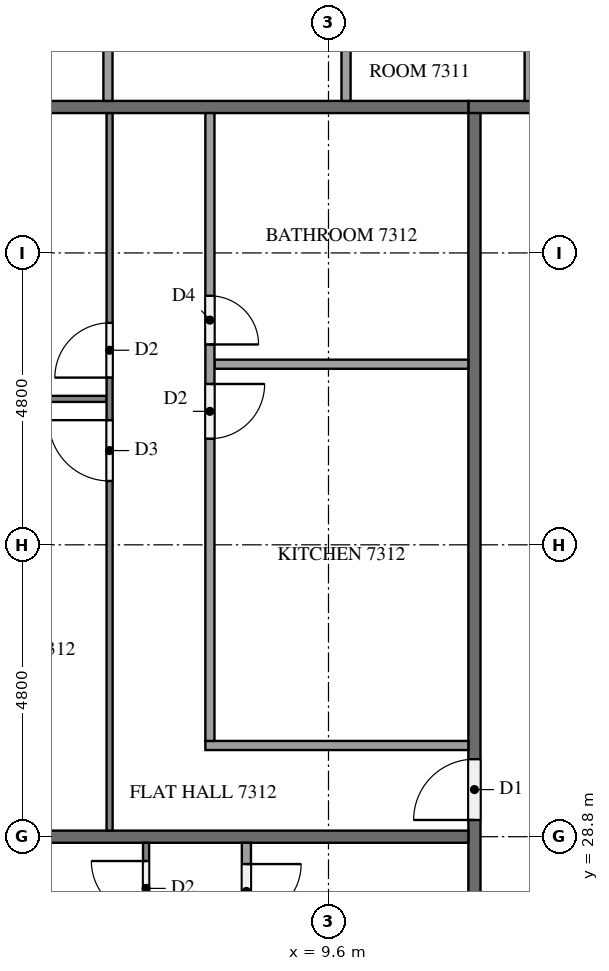
"""IFC4 building model, lengths in metres.
Left out: names, types, materials, properties, quantities, classifications, styles, units other than length and angle.
Written with IfcOpenShell. Run it as: python <this file> out.ifc"""

import sys

from ifc_helpers import new_model, si_unit, direction, frame, frame_2d, origin, place, context, subcontext, project, spatial, rectangle, extrude, element, fill, save


model = new_model("IFC4")
c1 = context("Model", 3, precision=1e-05, world=origin(), true_north=direction((0.0, 1.0)))
c2 = subcontext(c1, "Body", "Model", "MODEL_VIEW")
j1 = project(units=[si_unit("LENGTHUNIT", "METRE"), si_unit("PLANEANGLEUNIT", "RADIAN")], contexts=[c1])
p1 = place(None, origin())
s1 = spatial("IfcSite", under=j1, at=p1, CompositionType="ELEMENT")
p2 = place(p1, origin())
s2 = spatial("IfcBuilding", under=s1, at=p2, CompositionType="ELEMENT")
p3 = place(p2, frame((0.0, 0.0, 279.1)))
s3 = spatial("IfcBuildingStorey", under=s2, at=p3, CompositionType="ELEMENT", Elevation=279.1)
p4 = place(p3, frame((11.9, 40.8, 0.0), z_axis=(0.0, 0.0, 1.0), x_axis=(1.0, 0.0, 0.0)))
e1 = element("IfcWall", 1, at=p4, inside=s3, PredefinedType="PARTITIONING", context=c2, shape_type="SweptSolid", body=[
    extrude(rectangle(XDim=38.6, YDim=0.2, at=frame_2d((19.3, 0.0))), origin(), (0.0, 0.0, 1.0), 3.2),
])
p5 = place(p4, frame((33.975, 0.0, 0.0)))
e2 = element("IfcOpeningElement", 2, at=p5, cuts=e1, PredefinedType="OPENING", context=c2, shape_type="SweptSolid", body=[
    extrude(rectangle(XDim=1.0, YDim=2.1, at=frame_2d((0.5, 1.05))), frame((0.0, 0.11, 0.0), z_axis=(0.0, -1.0, 0.0), x_axis=(1.0, 0.0, 0.0)), (0.0, 0.0, 1.0), 0.22),
])
p6 = place(p4, frame((14.725, 0.0, 0.0)))
e3 = element("IfcOpeningElement", 3, at=p6, cuts=e1, PredefinedType="OPENING", context=c2, shape_type="SweptSolid", body=[
    extrude(rectangle(XDim=1.1, YDim=2.1, at=frame_2d((0.55, 1.05))), frame((0.0, 0.11, 0.0), z_axis=(0.0, -1.0, 0.0), x_axis=(1.0, 0.0, 0.0)), (0.0, 0.0, 1.0), 0.22),
])
p7 = place(p4, frame((13.225, 0.0, 0.0)))
e4 = element("IfcOpeningElement", 4, at=p7, cuts=e1, PredefinedType="OPENING", context=c2, shape_type="SweptSolid", body=[
    extrude(rectangle(XDim=1.0, YDim=2.1, at=frame_2d((0.5, 1.05))), frame((0.0, 0.11, 0.0), z_axis=(0.0, -1.0, 0.0), x_axis=(1.0, 0.0, 0.0)), (0.0, 0.0, 1.0), 0.22),
])
p8 = place(p4, frame((1.225, 0.0, 0.0)))
e5 = element("IfcOpeningElement", 5, at=p8, cuts=e1, PredefinedType="OPENING", context=c2, shape_type="SweptSolid", body=[
    extrude(rectangle(XDim=1.0, YDim=2.1, at=frame_2d((0.5, 1.05))), frame((0.0, 0.11, 0.0), z_axis=(0.0, -1.0, 0.0), x_axis=(1.0, 0.0, 0.0)), (0.0, 0.0, 1.0), 0.22),
])
p9 = place(p3, frame((12.0, 12.1, 0.0), z_axis=(0.0, 0.0, 1.0), x_axis=(0.0, 1.0, 0.0)))
e6 = element("IfcWall", 6, at=p9, inside=s3, PredefinedType="PARTITIONING", context=c2, shape_type="SweptSolid", body=[
    extrude(rectangle(XDim=28.6, YDim=0.2, at=frame_2d((14.3, 0.0))), origin(), (0.0, 0.0, 1.0), 3.2),
])
p10 = place(p9, frame((16.975, 0.0, 0.0)))
e7 = element("IfcOpeningElement", 7, at=p10, cuts=e6, PredefinedType="OPENING", context=c2, shape_type="SweptSolid", body=[
    extrude(rectangle(XDim=1.0, YDim=2.1, at=frame_2d((0.5, 1.05))), frame((0.0, 0.11, 0.0), z_axis=(0.0, -1.0, 0.0), x_axis=(1.0, 0.0, 0.0)), (0.0, 0.0, 1.0), 0.22),
])
p11 = place(p9, frame((0.175, 0.0, 0.0)))
e8 = element("IfcOpeningElement", 8, at=p11, cuts=e6, PredefinedType="OPENING", context=c2, shape_type="SweptSolid", body=[
    extrude(rectangle(XDim=1.0, YDim=2.1, at=frame_2d((0.5, 1.05))), frame((0.0, 0.11, 0.0), z_axis=(0.0, -1.0, 0.0), x_axis=(1.0, 0.0, 0.0)), (0.0, 0.0, 1.0), 0.22),
])
for number, where, z_axis, x_axis in (
    (9, (0.1, 40.8, 0.0), (0.0, 0.0, 1.0), (1.0, 0.0, 0.0)),
    (10, (0.1, 28.8, 0.0), (0.0, 0.0, 1.0), (1.0, 0.0, 0.0)),
):
    element("IfcWall", number, at=place(p3, frame(where, z_axis=z_axis, x_axis=x_axis)), inside=s3, PredefinedType="PARTITIONING", context=c2, shape_type="SweptSolid", body=[
        extrude(rectangle(XDim=11.8, YDim=0.2, at=frame_2d((5.9, 0.0))), origin(), (0.0, 0.0, 1.0), 3.2),
    ])
for number, where, z_axis, x_axis in (
    (11, (9.888, 40.9, 0.0), (0.0, 0.0, 1.0), (0.0, 1.0, 0.0)),
    (12, (5.973, 40.9, 0.0), (0.0, 0.0, 1.0), (0.0, 1.0, 0.0)),
):
    element("IfcWall", number, at=place(p3, frame(where, z_axis=z_axis, x_axis=x_axis)), inside=s3, PredefinedType="PARTITIONING", context=c2, shape_type="SweptSolid", body=[
        extrude(rectangle(XDim=1.925, YDim=0.15, at=frame_2d((0.962, 0.0))), origin(), (0.0, 0.0, 1.0), 3.2),
    ])
p12 = place(p3, frame((12.9, 40.9, 0.0), z_axis=(0.0, 0.0, 1.0), x_axis=(0.0, 1.0, 0.0)))
e13 = element("IfcWall", 13, at=p12, inside=s3, PredefinedType="PARTITIONING", context=c2, shape_type="SweptSolid", body=[
    extrude(rectangle(XDim=2.075, YDim=0.15, at=frame_2d((1.038, 0.0))), origin(), (0.0, 0.0, 1.0), 3.2),
])
p13 = place(p3, frame((5.95, 36.0, 0.0), z_axis=(0.0, 0.0, 1.0), x_axis=(-1.0, 0.0, 0.0)))
e14 = element("IfcWall", 14, at=p13, inside=s3, PredefinedType="PARTITIONING", context=c2, shape_type="SweptSolid", body=[
    extrude(rectangle(XDim=5.85, YDim=0.1, at=frame_2d((2.925, 0.0))), origin(), (0.0, 0.0, 1.0), 3.2),
])
p14 = place(p3, frame((6.0, 28.9, 0.0), z_axis=(0.0, 0.0, 1.0), x_axis=(0.0, 1.0, 0.0)))
e15 = element("IfcWall", 15, at=p14, inside=s3, PredefinedType="PARTITIONING", context=c2, shape_type="SweptSolid", body=[
    extrude(rectangle(XDim=11.8, YDim=0.1, at=frame_2d((5.9, 0.0))), origin(), (0.0, 0.0, 1.0), 3.2),
])
p15 = place(p14, frame((5.75, 0.0, 0.0)))
e16 = element("IfcOpeningElement", 16, at=p15, cuts=e15, PredefinedType="OPENING", context=c2, shape_type="SweptSolid", body=[
    extrude(rectangle(XDim=1.0, YDim=2.1, at=frame_2d((0.5, 1.05))), frame((0.0, 0.06, 0.0), z_axis=(0.0, -1.0, 0.0), x_axis=(1.0, 0.0, 0.0)), (0.0, 0.0, 1.0), 0.12),
])
p16 = place(p14, frame((7.45, 0.0, 0.0)))
e17 = element("IfcOpeningElement", 17, at=p16, cuts=e15, PredefinedType="OPENING", context=c2, shape_type="SweptSolid", body=[
    extrude(rectangle(XDim=0.9, YDim=2.1, at=frame_2d((0.45, 1.05))), frame((0.0, 0.06, 0.0), z_axis=(0.0, -1.0, 0.0), x_axis=(1.0, 0.0, 0.0)), (0.0, 0.0, 1.0), 0.12),
])
p17 = place(p3, frame((11.9, 36.57, 0.0), z_axis=(0.0, 0.0, 1.0), x_axis=(-1.0, 0.0, 0.0)))
e18 = element("IfcWall", 18, at=p17, inside=s3, PredefinedType="PARTITIONING", context=c2, shape_type="SweptSolid", body=[
    extrude(rectangle(XDim=4.175, YDim=0.15, at=frame_2d((2.087, 0.0))), origin(), (0.0, 0.0, 1.0), 3.2),
])
p18 = place(p3, frame((11.9, 30.3, 0.0), z_axis=(0.0, 0.0, 1.0), x_axis=(-1.0, 0.0, 0.0)))
e19 = element("IfcWall", 19, at=p18, inside=s3, PredefinedType="PARTITIONING", context=c2, shape_type="SweptSolid", body=[
    extrude(rectangle(XDim=4.325, YDim=0.15, at=frame_2d((2.163, 0.0))), origin(), (0.0, 0.0, 1.0), 3.2),
])
p19 = place(p3, frame((7.65, 40.7, 0.0), z_axis=(0.0, 0.0, 1.0), x_axis=(0.0, -1.0, 0.0)))
e20 = element("IfcWall", 20, at=p19, inside=s3, PredefinedType="PARTITIONING", context=c2, shape_type="SweptSolid", body=[
    extrude(rectangle(XDim=10.325, YDim=0.15, at=frame_2d((5.163, 0.0))), origin(), (0.0, 0.0, 1.0), 3.2),
])
p20 = place(p19, frame((4.455, 0.0, 0.0)))
e21 = element("IfcOpeningElement", 21, at=p20, cuts=e20, PredefinedType="OPENING", context=c2, shape_type="SweptSolid", body=[
    extrude(rectangle(XDim=0.9, YDim=2.1, at=frame_2d((0.45, 1.05))), frame((0.0, 0.085, 0.0), z_axis=(0.0, -1.0, 0.0), x_axis=(1.0, 0.0, 0.0)), (0.0, 0.0, 1.0), 0.17),
])
p21 = place(p19, frame((3.005, 0.0, 0.0)))
e22 = element("IfcOpeningElement", 22, at=p21, cuts=e20, PredefinedType="OPENING", context=c2, shape_type="SweptSolid", body=[
    extrude(rectangle(XDim=0.8, YDim=2.1, at=frame_2d((0.4, 1.05))), frame((0.0, 0.085, 0.0), z_axis=(0.0, -1.0, 0.0), x_axis=(1.0, 0.0, 0.0)), (0.0, 0.0, 1.0), 0.17),
])
p22 = place(p3, frame((6.6, 12.1, 0.0), z_axis=(0.0, 0.0, 1.0), x_axis=(0.0, 1.0, 0.0)))
e23 = element("IfcWall", 23, at=p22, inside=s3, PredefinedType="PARTITIONING", context=c2, shape_type="SweptSolid", body=[
    extrude(rectangle(XDim=16.6, YDim=0.1, at=frame_2d((8.3, 0.0))), origin(), (0.0, 0.0, 1.0), 3.2),
])
p23 = place(p22, frame((3.45, 0.0, 0.0)))
e24 = element("IfcOpeningElement", 24, at=p23, cuts=e23, PredefinedType="OPENING", context=c2, shape_type="SweptSolid", body=[
    extrude(rectangle(XDim=0.9, YDim=2.1, at=frame_2d((0.45, 1.05))), frame((0.0, 0.06, 0.0), z_axis=(0.0, -1.0, 0.0), x_axis=(1.0, 0.0, 0.0)), (0.0, 0.0, 1.0), 0.12),
])
p24 = place(p22, frame((5.05, 0.0, 0.0)))
e25 = element("IfcOpeningElement", 25, at=p24, cuts=e23, PredefinedType="OPENING", context=c2, shape_type="SweptSolid", body=[
    extrude(rectangle(XDim=1.0, YDim=2.1, at=frame_2d((0.5, 1.05))), frame((0.0, 0.06, 0.0), z_axis=(0.0, -1.0, 0.0), x_axis=(1.0, 0.0, 0.0)), (0.0, 0.0, 1.0), 0.12),
])
p25 = place(p22, frame((15.4, 0.0, 0.0)))
e26 = element("IfcOpeningElement", 26, at=p25, cuts=e23, PredefinedType="OPENING", context=c2, shape_type="SweptSolid", body=[
    extrude(rectangle(XDim=0.9, YDim=2.1, at=frame_2d((0.45, 1.05))), frame((0.0, 0.06, 0.0), z_axis=(0.0, -1.0, 0.0), x_axis=(1.0, 0.0, 0.0)), (0.0, 0.0, 1.0), 0.12),
])
p26 = place(p3, frame((8.25, 28.7, 0.0), z_axis=(0.0, 0.0, 1.0), x_axis=(0.0, -1.0, 0.0)))
e27 = element("IfcWall", 27, at=p26, inside=s3, PredefinedType="PARTITIONING", context=c2, shape_type="SweptSolid", body=[
    extrude(rectangle(XDim=15.125, YDim=0.15, at=frame_2d((7.562, 0.0))), origin(), (0.0, 0.0, 1.0), 3.2),
])
p27 = place(p26, frame((11.96, 0.0, 0.0)))
e28 = element("IfcOpeningElement", 28, at=p27, cuts=e27, PredefinedType="OPENING", context=c2, shape_type="SweptSolid", body=[
    extrude(rectangle(XDim=0.8, YDim=2.1, at=frame_2d((0.4, 1.05))), frame((0.0, 0.085, 0.0), z_axis=(0.0, -1.0, 0.0), x_axis=(1.0, 0.0, 0.0)), (0.0, 0.0, 1.0), 0.17),
])
p28 = place(p26, frame((10.41, 0.0, 0.0)))
e29 = element("IfcOpeningElement", 29, at=p28, cuts=e27, PredefinedType="OPENING", context=c2, shape_type="SweptSolid", body=[
    extrude(rectangle(XDim=0.9, YDim=2.1, at=frame_2d((0.45, 1.05))), frame((0.0, 0.085, 0.0), z_axis=(0.0, -1.0, 0.0), x_axis=(1.0, 0.0, 0.0)), (0.0, 0.0, 1.0), 0.17),
])
p29 = place(p26, frame((0.35, 0.0, 0.0)))
e30 = element("IfcOpeningElement", 30, at=p29, cuts=e27, PredefinedType="OPENING", context=c2, shape_type="SweptSolid", body=[
    extrude(rectangle(XDim=0.9, YDim=2.1, at=frame_2d((0.45, 1.05))), frame((0.0, 0.085, 0.0), z_axis=(0.0, -1.0, 0.0), x_axis=(1.0, 0.0, 0.0)), (0.0, 0.0, 1.0), 0.17),
])
p30 = place(p10, origin())
e31 = element("IfcDoor", 31, at=p30, inside=s3, OperationType="SINGLE_SWING_LEFT", PredefinedType="DOOR", context=c2, shape_type="SweptSolid", body=[
    extrude(rectangle(XDim=1.0, YDim=2.1, at=frame_2d((0.5, 1.05))), frame((0.0, 0.025, 0.0), z_axis=(0.0, -1.0, 0.0), x_axis=(1.0, 0.0, 0.0)), (0.0, 0.0, 1.0), 0.05),
])
fill(e7, e31)
p31 = place(p15, origin())
e32 = element("IfcDoor", 32, at=p31, inside=s3, OperationType="SINGLE_SWING_RIGHT", PredefinedType="DOOR", context=c2, shape_type="SweptSolid", body=[
    extrude(rectangle(XDim=1.0, YDim=2.1, at=frame_2d((0.5, 1.05))), frame((0.0, 0.025, 0.0), z_axis=(0.0, -1.0, 0.0), x_axis=(1.0, 0.0, 0.0)), (0.0, 0.0, 1.0), 0.05),
])
fill(e16, e32)
p32 = place(p16, origin())
e33 = element("IfcDoor", 33, at=p32, inside=s3, OperationType="SINGLE_SWING_LEFT", PredefinedType="DOOR", context=c2, shape_type="SweptSolid", body=[
    extrude(rectangle(XDim=0.9, YDim=2.1, at=frame_2d((0.45, 1.05))), frame((0.0, 0.025, 0.0), z_axis=(0.0, -1.0, 0.0), x_axis=(1.0, 0.0, 0.0)), (0.0, 0.0, 1.0), 0.05),
])
fill(e17, e33)
p33 = place(p20, origin())
e34 = element("IfcDoor", 34, at=p33, inside=s3, OperationType="SINGLE_SWING_LEFT", PredefinedType="DOOR", context=c2, shape_type="SweptSolid", body=[
    extrude(rectangle(XDim=0.9, YDim=2.1, at=frame_2d((0.45, 1.05))), frame((0.0, 0.025, 0.0), z_axis=(0.0, -1.0, 0.0), x_axis=(1.0, 0.0, 0.0)), (0.0, 0.0, 1.0), 0.05),
])
fill(e21, e34)
p34 = place(p21, origin())
e35 = element("IfcDoor", 35, at=p34, inside=s3, OperationType="SINGLE_SWING_RIGHT", PredefinedType="DOOR", context=c2, shape_type="SweptSolid", body=[
    extrude(rectangle(XDim=0.8, YDim=2.1, at=frame_2d((0.4, 1.05))), frame((0.0, 0.025, 0.0), z_axis=(0.0, -1.0, 0.0), x_axis=(1.0, 0.0, 0.0)), (0.0, 0.0, 1.0), 0.05),
])
fill(e22, e35)
p35 = place(p25, origin())
e36 = element("IfcDoor", 36, at=p35, inside=s3, OperationType="SINGLE_SWING_RIGHT", PredefinedType="DOOR", context=c2, shape_type="SweptSolid", body=[
    extrude(rectangle(XDim=0.9, YDim=2.1, at=frame_2d((0.45, 1.05))), frame((0.0, 0.025, 0.0), z_axis=(0.0, -1.0, 0.0), x_axis=(1.0, 0.0, 0.0)), (0.0, 0.0, 1.0), 0.05),
])
fill(e26, e36)
p36 = place(p29, origin())
e37 = element("IfcDoor", 37, at=p36, inside=s3, OperationType="SINGLE_SWING_LEFT", PredefinedType="DOOR", context=c2, shape_type="SweptSolid", body=[
    extrude(rectangle(XDim=0.9, YDim=2.1, at=frame_2d((0.45, 1.05))), frame((0.0, 0.025, 0.0), z_axis=(0.0, -1.0, 0.0), x_axis=(1.0, 0.0, 0.0)), (0.0, 0.0, 1.0), 0.05),
])
fill(e30, e37)
save(model, sys.argv[1])
